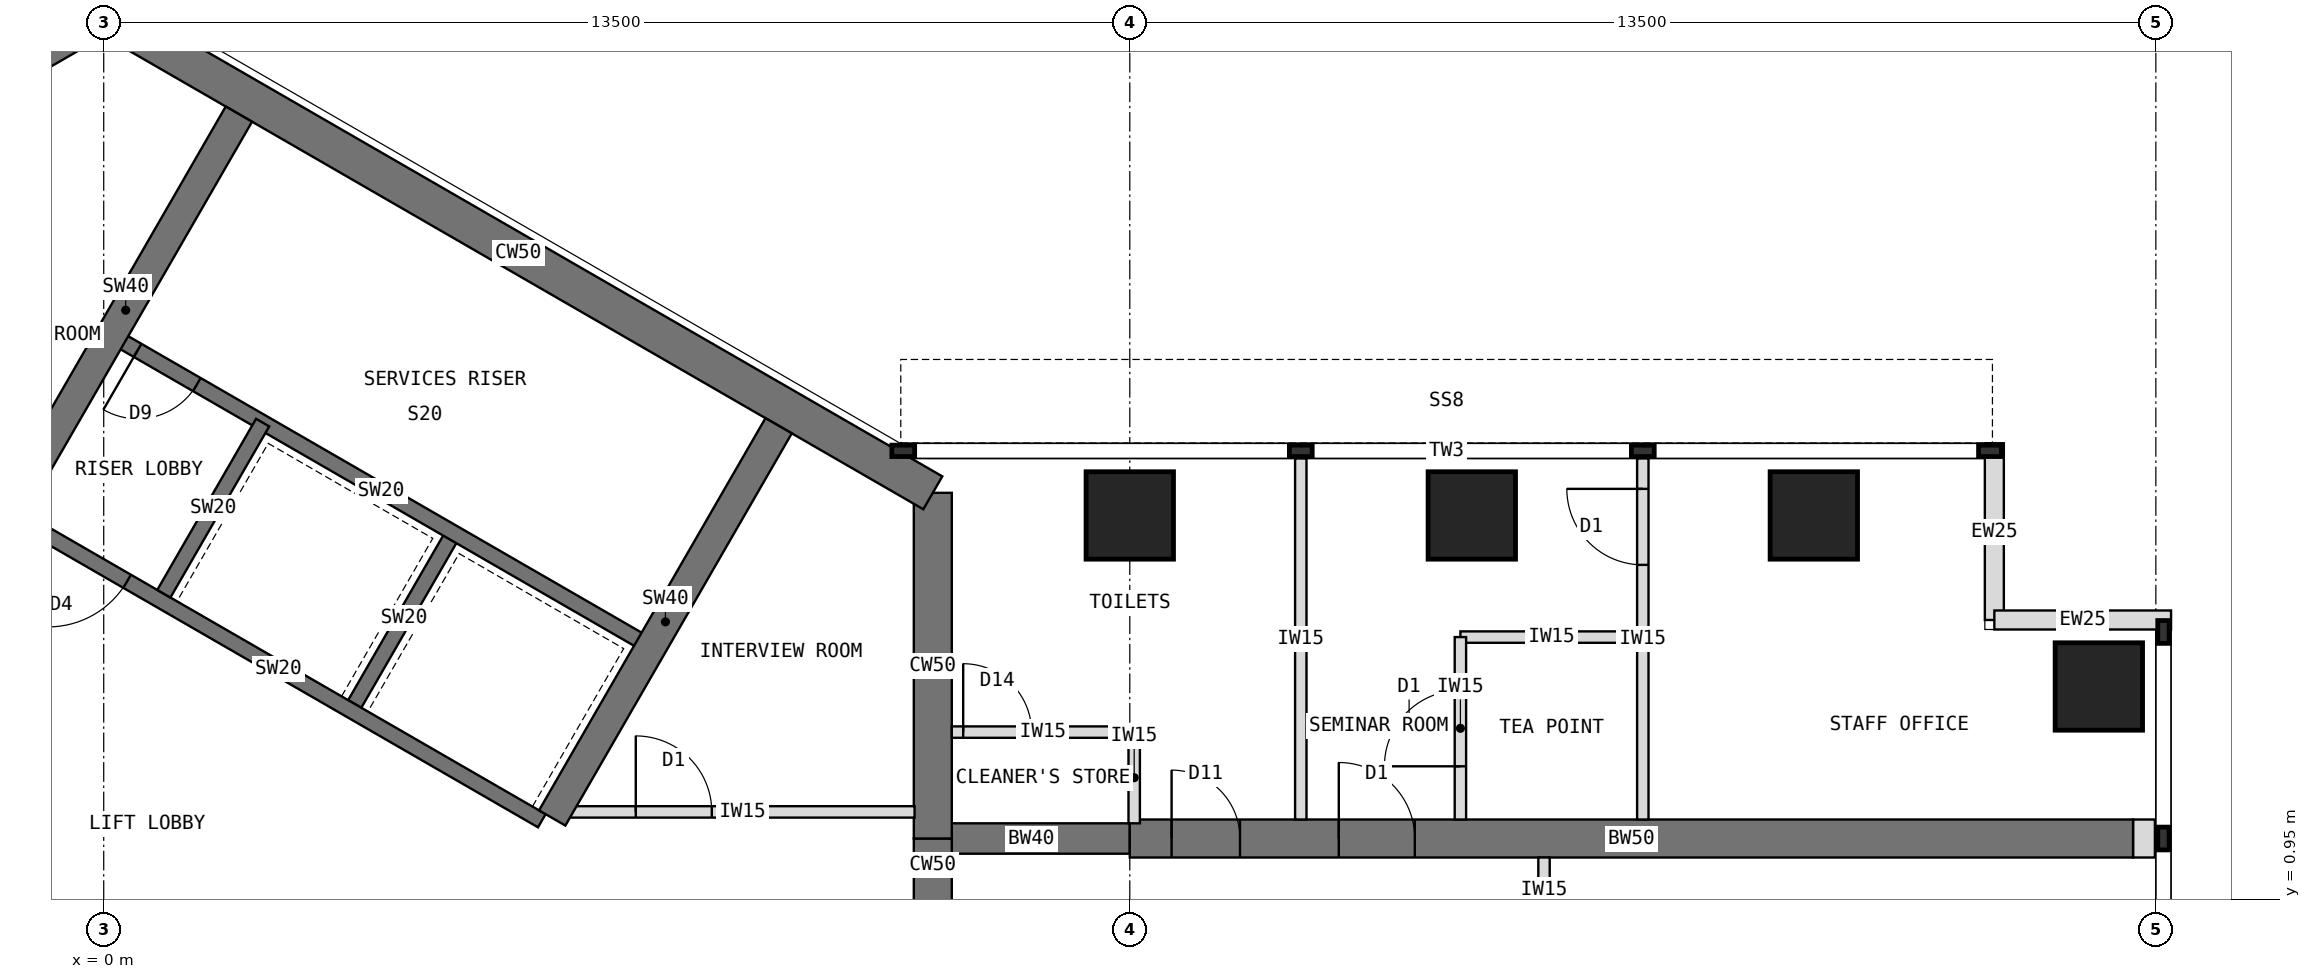
"""IFC4 building model, lengths in metres.
Left out: names, types, materials, properties, quantities, classifications, styles, units other than length and angle.
Written with IfcOpenShell. Run it as: python <this file> out.ifc"""

import sys

from ifc_helpers import new_model, si_unit, direction, frame, frame_2d, origin, origin_2d, place, context, subcontext, project, spatial, rectangle, extrude, element, fill, save


model = new_model("IFC4")
c1 = context("Model", 3, precision=1e-05, world=origin(), true_north=direction((0.0, 1.0)))
c2 = subcontext(c1, "Body", "Model", "MODEL_VIEW")
j1 = project(units=[si_unit("LENGTHUNIT", "METRE"), si_unit("PLANEANGLEUNIT", "RADIAN")], contexts=[c1])
p1 = place(None, origin())
s1 = spatial("IfcSite", under=j1, at=p1, CompositionType="ELEMENT")
p2 = place(p1, origin())
s2 = spatial("IfcBuilding", under=s1, at=p2, CompositionType="ELEMENT")
p3 = place(p2, frame((0.0, 0.0, 206.5)))
s3 = spatial("IfcBuildingStorey", under=s2, at=p3, CompositionType="ELEMENT", Elevation=206.5)
p4 = place(p3, frame((10.908, -1.75, 0.0), z_axis=(0.0, 0.0, 1.0), x_axis=(0.0, 1.0, 0.0)))
e1 = element("IfcWall", 1, at=p4, inside=s3, PredefinedType="SHEAR", context=c2, shape_type="SweptSolid", body=[
    extrude(rectangle(XDim=3.5, YDim=0.5, at=frame_2d((1.75, 0.0))), origin(), (0.0, 0.0, 1.0), 4.0),
])
p5 = place(p4, frame((0.85, 0.0, 0.0)))
e2 = element("IfcOpeningElement", 2, at=p5, cuts=e1, PredefinedType="OPENING", context=c2, shape_type="SweptSolid", body=[
    extrude(rectangle(XDim=1.8, YDim=2.1, at=frame_2d((0.9, 1.05))), frame((0.0, 0.26, 0.0), z_axis=(0.0, -1.0, 0.0), x_axis=(1.0, 0.0, 0.0)), (0.0, 0.0, 1.0), 0.52),
])
p6 = place(p3, frame((10.908, 1.75, 0.0), z_axis=(0.0, 0.0, 1.0), x_axis=(0.0, 1.0, 0.0)))
e3 = element("IfcWall", 3, at=p6, inside=s3, PredefinedType="SHEAR", context=c2, shape_type="SweptSolid", body=[
    extrude(rectangle(XDim=4.548, YDim=0.5, at=frame_2d((2.274, 0.0))), origin(), (0.0, 0.0, 1.0), 4.0),
])
p7 = place(p3, frame((10.908, 6.298, 0.0), z_axis=(0.0, 0.0, 1.0), x_axis=(-0.866021940709, 0.500005998175, 0.0)))
e4 = element("IfcWall", 4, at=p7, inside=s3, PredefinedType="SHEAR", context=c2, shape_type="SweptSolid", body=[
    extrude(rectangle(XDim=12.596, YDim=0.5, at=frame_2d((6.298, 0.0))), origin(), (0.0, 0.0, 1.0), 4.0),
])
p8 = place(p3, frame((0.0, 12.596, 0.0), z_axis=(0.0, 0.0, 1.0), x_axis=(-0.866011268655, -0.500024481964, 0.0)))
e5 = element("IfcWall", 5, at=p8, inside=s3, PredefinedType="SHEAR", context=c2, shape_type="SweptSolid", body=[
    extrude(rectangle(XDim=4.548, YDim=0.5, at=frame_2d((2.274, 0.0))), origin(), (0.0, 0.0, 1.0), 4.0),
])
p9 = place(p3, frame((10.908, 1.75, 0.0), z_axis=(0.0, 0.0, 1.0), x_axis=(1.0, 0.0, 0.0)))
e6 = element("IfcWall", 6, at=p9, inside=s3, PredefinedType="SHEAR", context=c2, shape_type="SweptSolid", body=[
    extrude(rectangle(XDim=2.592, YDim=0.4, at=frame_2d((1.296, 0.0))), origin(), (0.0, 0.0, 1.0), 4.0),
])
p10 = place(p3, frame((13.5, 1.75, 0.0), z_axis=(0.0, 0.0, 1.0), x_axis=(1.0, 0.0, 0.0)))
e7 = element("IfcWall", 7, at=p10, inside=s3, PredefinedType="SHEAR", context=c2, shape_type="SweptSolid", body=[
    extrude(rectangle(XDim=13.2, YDim=0.5, at=frame_2d((6.6, 0.0))), origin(), (0.0, 0.0, 1.0), 4.0),
])
p11 = place(p10, frame((0.55, 0.0, 0.0)))
e8 = element("IfcOpeningElement", 8, at=p11, cuts=e7, PredefinedType="OPENING", context=c2, shape_type="SweptSolid", body=[
    extrude(rectangle(XDim=0.9, YDim=2.1, at=frame_2d((0.45, 1.05))), frame((0.0, 0.26, 0.0), z_axis=(0.0, -1.0, 0.0), x_axis=(1.0, 0.0, 0.0)), (0.0, 0.0, 1.0), 0.52),
])
p12 = place(p10, frame((2.75, 0.0, 0.0)))
e9 = element("IfcOpeningElement", 9, at=p12, cuts=e7, PredefinedType="OPENING", context=c2, shape_type="SweptSolid", body=[
    extrude(rectangle(XDim=1.0, YDim=2.1, at=frame_2d((0.5, 1.05))), frame((0.0, 0.26, 0.0), z_axis=(0.0, -1.0, 0.0), x_axis=(1.0, 0.0, 0.0)), (0.0, 0.0, 1.0), 0.52),
])
for number, where, z_axis, x_axis in (
    (10, (13.5, 6.0, 0.0), (0.0, 0.0, 1.0), (1.0, 0.0, 0.0)),
    (11, (18.0, 6.0, 0.0), (0.0, 0.0, 1.0), (1.0, 0.0, 0.0)),
    (12, (22.5, 6.0, 0.0), (0.0, 0.0, 1.0), (1.0, 0.0, 0.0)),
    (13, (26.25, 3.75, 0.0), (0.0, 0.0, 1.0), (1.0, 0.0, 0.0)),
):
    element("IfcColumn", number, at=place(p3, frame(where, z_axis=z_axis, x_axis=x_axis)), inside=s3, PredefinedType="COLUMN", context=c2, shape_type="SweptSolid", body=[
        extrude(rectangle(XDim=1.15, YDim=1.15, at=origin_2d()), origin(), (0.0, 0.0, 1.0), 4.0),
    ])
for number, where, z_axis, x_axis in (
    (14, (24.875, 6.95, 0.0), (0.0, 0.0, 1.0), (0.0, -1.0, 0.0)),
    (15, (24.875, 4.625, 0.0), (0.0, 0.0, 1.0), (1.0, 0.0, 0.0)),
):
    element("IfcWall", number, at=place(p3, frame(where, z_axis=z_axis, x_axis=x_axis)), inside=s3, PredefinedType="STANDARD", context=c2, shape_type="SweptSolid", body=[
        extrude(rectangle(XDim=2.325, YDim=0.25, at=frame_2d((1.163, 0.0))), origin(), (0.0, 0.0, 1.0), 3.8),
    ])
p13 = place(p3, frame((26.7, 1.75, 0.0), z_axis=(0.0, 0.0, 1.0), x_axis=(1.0, 0.0, 0.0)))
e16 = element("IfcWall", 16, at=p13, inside=s3, PredefinedType="PARTITIONING", context=c2, shape_type="SweptSolid", body=[
    extrude(rectangle(XDim=0.288, YDim=0.5, at=frame_2d((0.144, 0.0))), origin(), (0.0, 0.0, 1.0), 3.8),
])
p14 = place(p3, frame((5.764, 1.984, 0.0), z_axis=(0.0, 0.0, 1.0), x_axis=(-0.866026010844, 0.49999894854, 0.0)))
e17 = element("IfcWall", 17, at=p14, inside=s3, PredefinedType="SHEAR", context=c2, shape_type="SweptSolid", body=[
    extrude(rectangle(XDim=8.0, YDim=0.2, at=frame_2d((4.0, 0.0))), origin(), (0.0, 0.0, 1.0), 4.0),
])
p15 = place(p14, frame((6.3, 0.0, 0.0)))
e18 = element("IfcOpeningElement", 18, at=p15, cuts=e17, PredefinedType="OPENING", context=c2, shape_type="SweptSolid", body=[
    extrude(rectangle(XDim=1.2, YDim=2.1, at=frame_2d((0.6, 1.05))), frame((0.0, 0.11, 0.0), z_axis=(0.0, -1.0, 0.0), x_axis=(1.0, 0.0, 0.0)), (0.0, 0.0, 1.0), 0.22),
])
for number, where, z_axis, x_axis in (
    (19, (3.303, 3.52, 0.0), (0.0, 0.0, 1.0), (0.5, 0.866, 0.0)),
    (20, (0.791, 4.97, 0.0), (0.0, 0.0, 1.0), (0.5, 0.866, 0.0)),
):
    element("IfcWall", number, at=place(p3, frame(where, z_axis=z_axis, x_axis=x_axis)), inside=s3, PredefinedType="SHEAR", context=c2, shape_type="SweptSolid", body=[
        extrude(rectangle(XDim=2.6, YDim=0.2, at=frame_2d((1.3, 0.0))), origin(), (0.0, 0.0, 1.0), 4.0),
    ])
p16 = place(p3, frame((7.114, 4.322, 0.0), z_axis=(0.0, 0.0, 1.0), x_axis=(-0.866026010844, 0.49999894854, 0.0)))
e21 = element("IfcWall", 21, at=p16, inside=s3, PredefinedType="SHEAR", context=c2, shape_type="SweptSolid", body=[
    extrude(rectangle(XDim=8.0, YDim=0.2, at=frame_2d((4.0, 0.0))), origin(), (0.0, 0.0, 1.0), 4.0),
])
p17 = place(p16, frame((6.8, 0.0, 0.0)))
e22 = element("IfcOpeningElement", 22, at=p17, cuts=e21, PredefinedType="OPENING", context=c2, shape_type="SweptSolid", body=[
    extrude(rectangle(XDim=0.9, YDim=2.1, at=frame_2d((0.45, 1.05))), frame((0.0, 0.11, 0.0), z_axis=(0.0, -1.0, 0.0), x_axis=(1.0, 0.0, 0.0)), (0.0, 0.0, 1.0), 0.22),
])
p18 = place(p3, frame((-1.201, 6.12, 0.0), z_axis=(0.0, 0.0, 1.0), x_axis=(0.500021575205, 0.866012946976, 0.0)))
e23 = element("IfcWall", 23, at=p18, inside=s3, PredefinedType="SHEAR", context=c2, shape_type="SweptSolid", body=[
    extrude(rectangle(XDim=5.958, YDim=0.4, at=frame_2d((2.979, 0.0))), origin(), (0.0, 0.0, 1.0), 4.0),
])
p19 = place(p3, frame((5.901, 2.02, 0.0), z_axis=(0.0, 0.0, 1.0), x_axis=(0.500003832394, 0.86602319114, 0.0)))
e24 = element("IfcWall", 24, at=p19, inside=s3, PredefinedType="SHEAR", context=c2, shape_type="SweptSolid", body=[
    extrude(rectangle(XDim=5.958, YDim=0.4, at=frame_2d((2.979, 0.0))), origin(), (0.0, 0.0, 1.0), 4.0),
])
p20 = place(p3, frame((15.75, 2.0, 0.0), z_axis=(0.0, 0.0, 1.0), x_axis=(0.0, 1.0, 0.0)))
e25 = element("IfcWall", 25, at=p20, inside=s3, PredefinedType="PARTITIONING", context=c2, shape_type="SweptSolid", body=[
    extrude(rectangle(XDim=4.75, YDim=0.15, at=frame_2d((2.375, 0.0))), origin(), (0.0, 0.0, 1.0), 3.8),
])
p21 = place(p3, frame((20.25, 2.0, 0.0), z_axis=(0.0, 0.0, 1.0), x_axis=(0.0, 1.0, 0.0)))
e26 = element("IfcWall", 26, at=p21, inside=s3, PredefinedType="PARTITIONING", context=c2, shape_type="SweptSolid", body=[
    extrude(rectangle(XDim=4.75, YDim=0.15, at=frame_2d((2.375, 0.0))), origin(), (0.0, 0.0, 1.0), 3.8),
])
p22 = place(p21, frame((3.35, 0.0, 0.0)))
e27 = element("IfcOpeningElement", 27, at=p22, cuts=e26, PredefinedType="OPENING", context=c2, shape_type="SweptSolid", body=[
    extrude(rectangle(XDim=1.0, YDim=2.1, at=frame_2d((0.5, 1.05))), frame((0.0, 0.085, 0.0), z_axis=(0.0, -1.0, 0.0), x_axis=(1.0, 0.0, 0.0)), (0.0, 0.0, 1.0), 0.17),
])
p23 = place(p3, frame((17.85, 4.4, 0.0), z_axis=(0.0, 0.0, 1.0), x_axis=(1.0, 0.0, 0.0)))
e28 = element("IfcWall", 28, at=p23, inside=s3, PredefinedType="PARTITIONING", context=c2, shape_type="SweptSolid", body=[
    extrude(rectangle(XDim=2.4, YDim=0.15, at=frame_2d((1.2, 0.0))), origin(), (0.0, 0.0, 1.0), 3.8),
])
p24 = place(p3, frame((17.85, 2.0, 0.0), z_axis=(0.0, 0.0, 1.0), x_axis=(0.0, 1.0, 0.0)))
e29 = element("IfcWall", 29, at=p24, inside=s3, PredefinedType="PARTITIONING", context=c2, shape_type="SweptSolid", body=[
    extrude(rectangle(XDim=2.4, YDim=0.15, at=frame_2d((1.2, 0.0))), origin(), (0.0, 0.0, 1.0), 3.8),
])
p25 = place(p24, frame((0.7, 0.0, 0.0)))
e30 = element("IfcOpeningElement", 30, at=p25, cuts=e29, PredefinedType="OPENING", context=c2, shape_type="SweptSolid", body=[
    extrude(rectangle(XDim=1.0, YDim=2.1, at=frame_2d((0.5, 1.05))), frame((0.0, 0.085, 0.0), z_axis=(0.0, -1.0, 0.0), x_axis=(1.0, 0.0, 0.0)), (0.0, 0.0, 1.0), 0.17),
])
p26 = place(p3, frame((11.158, 3.15, 0.0), z_axis=(0.0, 0.0, 1.0), x_axis=(1.0, 0.0, 0.0)))
e31 = element("IfcWall", 31, at=p26, inside=s3, PredefinedType="PARTITIONING", context=c2, shape_type="SweptSolid", body=[
    extrude(rectangle(XDim=2.4, YDim=0.15, at=frame_2d((1.2, 0.0))), origin(), (0.0, 0.0, 1.0), 3.8),
])
p27 = place(p26, frame((0.15, 0.0, 0.0)))
e32 = element("IfcOpeningElement", 32, at=p27, cuts=e31, PredefinedType="OPENING", context=c2, shape_type="SweptSolid", body=[
    extrude(rectangle(XDim=0.9, YDim=2.1, at=frame_2d((0.45, 1.05))), frame((0.0, 0.085, 0.0), z_axis=(0.0, -1.0, 0.0), x_axis=(1.0, 0.0, 0.0)), (0.0, 0.0, 1.0), 0.17),
])
p28 = place(p3, frame((13.558, 1.95, 0.0), z_axis=(0.0, 0.0, 1.0), x_axis=(0.0, 1.0, 0.0)))
e33 = element("IfcWall", 33, at=p28, inside=s3, PredefinedType="PARTITIONING", context=c2, shape_type="SweptSolid", body=[
    extrude(rectangle(XDim=1.2, YDim=0.15, at=frame_2d((0.6, 0.0))), origin(), (0.0, 0.0, 1.0), 3.267),
])
p29 = place(p3, frame((6.143, 2.1, 0.0), z_axis=(0.0, 0.0, 1.0), x_axis=(1.0, 0.0, 0.0)))
e34 = element("IfcWall", 34, at=p29, inside=s3, PredefinedType="PARTITIONING", context=c2, shape_type="SweptSolid", body=[
    extrude(rectangle(XDim=4.526, YDim=0.15, at=frame_2d((2.263, 0.0))), origin(), (0.0, 0.0, 1.0), 3.8),
])
p30 = place(p29, frame((0.858, 0.0, 0.0)))
e35 = element("IfcOpeningElement", 35, at=p30, cuts=e34, PredefinedType="OPENING", context=c2, shape_type="SweptSolid", body=[
    extrude(rectangle(XDim=1.0, YDim=2.1, at=frame_2d((0.5, 1.05))), frame((0.0, 0.085, 0.0), z_axis=(0.0, -1.0, 0.0), x_axis=(1.0, 0.0, 0.0)), (0.0, 0.0, 1.0), 0.17),
])
p31 = place(p3, frame((18.95, -1.5, 0.0), z_axis=(0.0, 0.0, 1.0), x_axis=(0.0, 1.0, 0.0)))
e36 = element("IfcWall", 36, at=p31, inside=s3, PredefinedType="PARTITIONING", context=c2, shape_type="SweptSolid", body=[
    extrude(rectangle(XDim=3.0, YDim=0.15, at=frame_2d((1.5, 0.0))), origin(), (0.0, 0.0, 1.0), 3.8),
])
p32 = place(p31, frame((1.0, 0.0, 0.0)))
e37 = element("IfcOpeningElement", 37, at=p32, cuts=e36, PredefinedType="OPENING", context=c2, shape_type="SweptSolid", body=[
    extrude(rectangle(XDim=1.0, YDim=2.1, at=frame_2d((0.5, 1.05))), frame((0.0, 0.085, 0.0), z_axis=(0.0, -1.0, 0.0), x_axis=(1.0, 0.0, 0.0)), (0.0, 0.0, 1.0), 0.17),
])
p33 = place(p15, origin())
e38 = element("IfcDoor", 38, at=p33, inside=s3, OperationType="SINGLE_SWING_RIGHT", PredefinedType="DOOR", context=c2, shape_type="SweptSolid", body=[
    extrude(rectangle(XDim=1.2, YDim=2.1, at=frame_2d((0.6, 1.05))), frame((0.0, 0.025, 0.0), z_axis=(0.0, -1.0, 0.0), x_axis=(1.0, 0.0, 0.0)), (0.0, 0.0, 1.0), 0.05),
])
fill(e18, e38)
p34 = place(p17, origin())
e39 = element("IfcDoor", 39, at=p34, inside=s3, OperationType="SINGLE_SWING_RIGHT", PredefinedType="DOOR", context=c2, shape_type="SweptSolid", body=[
    extrude(rectangle(XDim=0.9, YDim=2.1, at=frame_2d((0.45, 1.05))), frame((0.0, 0.025, 0.0), z_axis=(0.0, -1.0, 0.0), x_axis=(1.0, 0.0, 0.0)), (0.0, 0.0, 1.0), 0.05),
])
fill(e22, e39)
p35 = place(p22, origin())
e40 = element("IfcDoor", 40, at=p35, inside=s3, OperationType="SINGLE_SWING_RIGHT", PredefinedType="DOOR", context=c2, shape_type="SweptSolid", body=[
    extrude(rectangle(XDim=1.0, YDim=2.1, at=frame_2d((0.5, 1.05))), frame((0.0, 0.025, 0.0), z_axis=(0.0, -1.0, 0.0), x_axis=(1.0, 0.0, 0.0)), (0.0, 0.0, 1.0), 0.05),
])
fill(e27, e40)
p36 = place(p25, origin())
e41 = element("IfcDoor", 41, at=p36, inside=s3, OperationType="SINGLE_SWING_LEFT", PredefinedType="DOOR", context=c2, shape_type="SweptSolid", body=[
    extrude(rectangle(XDim=1.0, YDim=2.1, at=frame_2d((0.5, 1.05))), frame((0.0, 0.025, 0.0), z_axis=(0.0, -1.0, 0.0), x_axis=(1.0, 0.0, 0.0)), (0.0, 0.0, 1.0), 0.05),
])
fill(e30, e41)
p37 = place(p27, origin())
e42 = element("IfcDoor", 42, at=p37, inside=s3, OperationType="SINGLE_SWING_LEFT", PredefinedType="DOOR", context=c2, shape_type="SweptSolid", body=[
    extrude(rectangle(XDim=0.9, YDim=2.1, at=frame_2d((0.45, 1.05))), frame((0.0, 0.025, 0.0), z_axis=(0.0, -1.0, 0.0), x_axis=(1.0, 0.0, 0.0)), (0.0, 0.0, 1.0), 0.05),
])
fill(e32, e42)
p38 = place(p30, origin())
e43 = element("IfcDoor", 43, at=p38, inside=s3, OperationType="SINGLE_SWING_LEFT", PredefinedType="DOOR", context=c2, shape_type="SweptSolid", body=[
    extrude(rectangle(XDim=1.0, YDim=2.1, at=frame_2d((0.5, 1.05))), frame((0.0, 0.025, 0.0), z_axis=(0.0, -1.0, 0.0), x_axis=(1.0, 0.0, 0.0)), (0.0, 0.0, 1.0), 0.05),
])
fill(e35, e43)
p39 = place(p11, origin())
e44 = element("IfcDoor", 44, at=p39, inside=s3, OperationType="SINGLE_SWING_LEFT", PredefinedType="DOOR", context=c2, shape_type="SweptSolid", body=[
    extrude(rectangle(XDim=0.9, YDim=2.1, at=frame_2d((0.45, 1.05))), frame((0.0, 0.025, 0.0), z_axis=(0.0, -1.0, 0.0), x_axis=(1.0, 0.0, 0.0)), (0.0, 0.0, 1.0), 0.05),
])
fill(e8, e44)
p40 = place(p12, origin())
e45 = element("IfcDoor", 45, at=p40, inside=s3, OperationType="SINGLE_SWING_LEFT", PredefinedType="DOOR", context=c2, shape_type="SweptSolid", body=[
    extrude(rectangle(XDim=1.0, YDim=2.1, at=frame_2d((0.5, 1.05))), frame((0.0, 0.025, 0.0), z_axis=(0.0, -1.0, 0.0), x_axis=(1.0, 0.0, 0.0)), (0.0, 0.0, 1.0), 0.05),
])
fill(e9, e45)
save(model, sys.argv[1])
